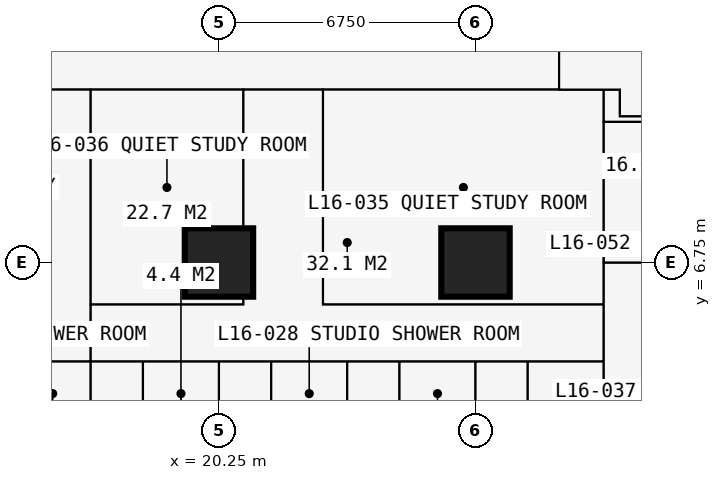
"""IFC4 building model, lengths in metres.
Left out: names, types, materials, properties, quantities, classifications, styles, units other than length and angle.
Written with IfcOpenShell. Run it as: python <this file> out.ifc"""

import sys

from ifc_helpers import new_model, si_unit, direction, frame, frame_2d, origin, origin_2d, place, context, subcontext, project, spatial, rectangle, extrude, element, fill, save


model = new_model("IFC4")
c1 = context("Model", 3, precision=1e-05, world=origin(), true_north=direction((0.0, 1.0)))
c2 = subcontext(c1, "Body", "Model", "MODEL_VIEW")
j1 = project(units=[si_unit("LENGTHUNIT", "METRE"), si_unit("PLANEANGLEUNIT", "RADIAN")], contexts=[c1])
p1 = place(None, origin())
s1 = spatial("IfcSite", under=j1, at=p1, CompositionType="ELEMENT")
p2 = place(p1, origin())
s2 = spatial("IfcBuilding", under=s1, at=p2, CompositionType="ELEMENT")
p3 = place(p2, frame((0.0, 0.0, 61.2)))
s3 = spatial("IfcBuildingStorey", under=s2, at=p3, CompositionType="ELEMENT", Elevation=61.2)
for number, where, z_axis, x_axis in (
    (1, (20.25, 6.75, 0.0), (0.0, 0.0, 1.0), (1.0, 0.0, 0.0)),
    (2, (27.0, 6.75, 0.0), (0.0, 0.0, 1.0), (1.0, 0.0, 0.0)),
):
    element("IfcColumn", number, at=place(p3, frame(where, z_axis=z_axis, x_axis=x_axis)), inside=s3, PredefinedType="COLUMN", context=c2, shape_type="SweptSolid", body=[
        extrude(rectangle(XDim=1.8, YDim=1.8, at=origin_2d()), origin(), (0.0, 0.0, 1.0), 3.6),
    ])
p4 = place(p3, frame((6.75, 4.15, 0.0), z_axis=(0.0, 0.0, 1.0), x_axis=(1.0, 0.0, 0.0)))
e3 = element("IfcWall", 3, at=p4, inside=s3, PredefinedType="PARTITIONING", context=c2, shape_type="SweptSolid", body=[
    extrude(rectangle(XDim=23.625, YDim=0.1, at=frame_2d((11.812, 0.0))), origin(), (0.0, 0.0, 1.0), 3.375),
])
p5 = place(p4, frame((0.2, 0.0, 0.0)))
e4 = element("IfcOpeningElement", 4, at=p5, cuts=e3, PredefinedType="OPENING", context=c2, shape_type="SweptSolid", body=[
    extrude(rectangle(XDim=0.95, YDim=2.2, at=frame_2d((0.475, 1.1))), frame((0.0, 0.06, 0.0), z_axis=(0.0, -1.0, 0.0), x_axis=(1.0, 0.0, 0.0)), (0.0, 0.0, 1.0), 0.12),
])
p6 = place(p4, frame((3.625, 0.0, 0.0)))
e5 = element("IfcOpeningElement", 5, at=p6, cuts=e3, PredefinedType="OPENING", context=c2, shape_type="SweptSolid", body=[
    extrude(rectangle(XDim=0.95, YDim=2.2, at=frame_2d((0.475, 1.1))), frame((0.0, 0.06, 0.0), z_axis=(0.0, -1.0, 0.0), x_axis=(1.0, 0.0, 0.0)), (0.0, 0.0, 1.0), 0.12),
])
p7 = place(p4, frame((7.0, 0.0, 0.0)))
e6 = element("IfcOpeningElement", 6, at=p7, cuts=e3, PredefinedType="OPENING", context=c2, shape_type="SweptSolid", body=[
    extrude(rectangle(XDim=0.95, YDim=2.2, at=frame_2d((0.475, 1.1))), frame((0.0, 0.06, 0.0), z_axis=(0.0, -1.0, 0.0), x_axis=(1.0, 0.0, 0.0)), (0.0, 0.0, 1.0), 0.12),
])
p8 = place(p4, frame((10.325, 0.0, 0.0)))
e7 = element("IfcOpeningElement", 7, at=p8, cuts=e3, PredefinedType="OPENING", context=c2, shape_type="SweptSolid", body=[
    extrude(rectangle(XDim=0.95, YDim=2.2, at=frame_2d((0.475, 1.1))), frame((0.0, 0.06, 0.0), z_axis=(0.0, -1.0, 0.0), x_axis=(1.0, 0.0, 0.0)), (0.0, 0.0, 1.0), 0.12),
])
p9 = place(p4, frame((13.75, 0.0, 0.0)))
e8 = element("IfcOpeningElement", 8, at=p9, cuts=e3, PredefinedType="OPENING", context=c2, shape_type="SweptSolid", body=[
    extrude(rectangle(XDim=0.95, YDim=2.2, at=frame_2d((0.475, 1.1))), frame((0.0, 0.06, 0.0), z_axis=(0.0, -1.0, 0.0), x_axis=(1.0, 0.0, 0.0)), (0.0, 0.0, 1.0), 0.12),
])
p10 = place(p4, frame((17.125, 0.0, 0.0)))
e9 = element("IfcOpeningElement", 9, at=p10, cuts=e3, PredefinedType="OPENING", context=c2, shape_type="SweptSolid", body=[
    extrude(rectangle(XDim=0.95, YDim=2.2, at=frame_2d((0.475, 1.1))), frame((0.0, 0.06, 0.0), z_axis=(0.0, -1.0, 0.0), x_axis=(1.0, 0.0, 0.0)), (0.0, 0.0, 1.0), 0.12),
])
p11 = place(p4, frame((20.5, 0.0, 0.0)))
e10 = element("IfcOpeningElement", 10, at=p11, cuts=e3, PredefinedType="OPENING", context=c2, shape_type="SweptSolid", body=[
    extrude(rectangle(XDim=0.95, YDim=2.2, at=frame_2d((0.475, 1.1))), frame((0.0, 0.06, 0.0), z_axis=(0.0, -1.0, 0.0), x_axis=(1.0, 0.0, 0.0)), (0.0, 0.0, 1.0), 0.12),
])
p12 = place(p3, frame((10.125, 11.3, 0.0), z_axis=(0.0, 0.0, 1.0), x_axis=(1.0, 0.0, 0.0)))
e11 = element("IfcWall", 11, at=p12, inside=s3, PredefinedType="PARTITIONING", context=c2, shape_type="SweptSolid", body=[
    extrude(rectangle(XDim=20.675, YDim=0.15, at=frame_2d((10.337, 0.0))), origin(), (0.0, 0.0, 1.0), 3.375),
])
p13 = place(p12, frame((5.2, 0.0, 0.0)))
e12 = element("IfcOpeningElement", 12, at=p13, cuts=e11, PredefinedType="OPENING", context=c2, shape_type="SweptSolid", body=[
    extrude(rectangle(XDim=1.0, YDim=2.2, at=frame_2d((0.5, 1.1))), frame((0.0, 0.085, 0.0), z_axis=(0.0, -1.0, 0.0), x_axis=(1.0, 0.0, 0.0)), (0.0, 0.0, 1.0), 0.17),
])
p14 = place(p12, frame((11.312, 0.0, 0.0)))
e13 = element("IfcOpeningElement", 13, at=p14, cuts=e11, PredefinedType="OPENING", context=c2, shape_type="SweptSolid", body=[
    extrude(rectangle(XDim=1.0, YDim=2.2, at=frame_2d((0.5, 1.1))), frame((0.0, 0.085, 0.0), z_axis=(0.0, -1.0, 0.0), x_axis=(1.0, 0.0, 0.0)), (0.0, 0.0, 1.0), 0.17),
])
p15 = place(p12, frame((2.425, 0.0, 0.0)))
e14 = element("IfcOpeningElement", 14, at=p15, cuts=e11, PredefinedType="OPENING", context=c2, shape_type="SweptSolid", body=[
    extrude(rectangle(XDim=0.95, YDim=2.2, at=frame_2d((0.475, 1.1))), frame((0.0, 0.085, 0.0), z_axis=(0.0, -1.0, 0.0), x_axis=(1.0, 0.0, 0.0)), (0.0, 0.0, 1.0), 0.17),
])
p16 = place(p3, frame((16.875, -0.734, 0.0), z_axis=(0.0, 0.0, 1.0), x_axis=(0.0, 1.0, 0.0)))
e15 = element("IfcWall", 15, at=p16, inside=s3, PredefinedType="PARTITIONING", context=c2, shape_type="SweptSolid", body=[
    extrude(rectangle(XDim=12.034, YDim=0.15, at=frame_2d((6.017, 0.0))), origin(), (0.0, 0.0, 1.0), 3.375),
])
p17 = place(p3, frame((16.875, 5.65, 0.0), z_axis=(0.0, 0.0, 1.0), x_axis=(1.0, 0.0, 0.0)))
e16 = element("IfcWall", 16, at=p17, inside=s3, PredefinedType="PARTITIONING", context=c2, shape_type="SweptSolid", body=[
    extrude(rectangle(XDim=4.012, YDim=0.15, at=frame_2d((2.006, 0.0))), origin(), (0.0, 0.0, 1.0), 3.375),
])
p18 = place(p3, frame((18.25, 1.95, 0.0), z_axis=(0.0, 0.0, 1.0), x_axis=(0.0, 1.0, 0.0)))
e17 = element("IfcWall", 17, at=p18, inside=s3, PredefinedType="PARTITIONING", context=c2, shape_type="SweptSolid", body=[
    extrude(rectangle(XDim=2.2, YDim=0.1, at=frame_2d((1.1, 0.0))), origin(), (0.0, 0.0, 1.0), 3.375),
])
p19 = place(p18, frame((0.65, 0.0, 0.0)))
e18 = element("IfcOpeningElement", 18, at=p19, cuts=e17, PredefinedType="OPENING", context=c2, shape_type="SweptSolid", body=[
    extrude(rectangle(XDim=0.9, YDim=2.2, at=frame_2d((0.45, 1.1))), frame((0.0, 0.06, 0.0), z_axis=(0.0, -1.0, 0.0), x_axis=(1.0, 0.0, 0.0)), (0.0, 0.0, 1.0), 0.12),
])
p20 = place(p3, frame((20.25, -0.734, 0.0), z_axis=(0.0, 0.0, 1.0), x_axis=(0.0, 1.0, 0.0)))
e19 = element("IfcWall", 19, at=p20, inside=s3, PredefinedType="PARTITIONING", context=c2, shape_type="SweptSolid", body=[
    extrude(rectangle(XDim=4.884, YDim=0.175, at=frame_2d((2.442, 0.0))), origin(), (0.0, 0.0, 1.0), 2.61),
])
p21 = place(p3, frame((20.887, 5.65, 0.0), z_axis=(0.0, 0.0, 1.0), x_axis=(0.0, 1.0, 0.0)))
e20 = element("IfcWall", 20, at=p21, inside=s3, PredefinedType="PARTITIONING", context=c2, shape_type="SweptSolid", body=[
    extrude(rectangle(XDim=5.65, YDim=0.15, at=frame_2d((2.825, 0.0))), origin(), (0.0, 0.0, 1.0), 3.375),
])
p22 = place(p21, frame((2.35, 0.0, 0.0)))
e21 = element("IfcOpeningElement", 21, at=p22, cuts=e20, PredefinedType="OPENING", context=c2, shape_type="SweptSolid", body=[
    extrude(rectangle(XDim=0.95, YDim=2.2, at=frame_2d((0.475, 1.1))), frame((0.0, 0.085, 0.0), z_axis=(0.0, -1.0, 0.0), x_axis=(1.0, 0.0, 0.0)), (0.0, 0.0, 1.0), 0.17),
])
p23 = place(p3, frame((21.625, 1.95, 0.0), z_axis=(0.0, 0.0, 1.0), x_axis=(0.0, 1.0, 0.0)))
e22 = element("IfcWall", 22, at=p23, inside=s3, PredefinedType="PARTITIONING", context=c2, shape_type="SweptSolid", body=[
    extrude(rectangle(XDim=2.2, YDim=0.1, at=frame_2d((1.1, 0.0))), origin(), (0.0, 0.0, 1.0), 3.375),
])
p24 = place(p23, frame((0.65, 0.0, 0.0)))
e23 = element("IfcOpeningElement", 23, at=p24, cuts=e22, PredefinedType="OPENING", context=c2, shape_type="SweptSolid", body=[
    extrude(rectangle(XDim=0.9, YDim=2.2, at=frame_2d((0.45, 1.1))), frame((0.0, 0.06, 0.0), z_axis=(0.0, -1.0, 0.0), x_axis=(1.0, 0.0, 0.0)), (0.0, 0.0, 1.0), 0.12),
])
p25 = place(p3, frame((22.988, 5.65, 0.0), z_axis=(0.0, 0.0, 1.0), x_axis=(1.0, 0.0, 0.0)))
e24 = element("IfcWall", 24, at=p25, inside=s3, PredefinedType="PARTITIONING", context=c2, shape_type="SweptSolid", body=[
    extrude(rectangle(XDim=7.387, YDim=0.15, at=frame_2d((3.694, 0.0))), origin(), (0.0, 0.0, 1.0), 3.375),
])
p26 = place(p25, frame((2.15, 0.0, 0.0)))
e25 = element("IfcOpeningElement", 25, at=p26, cuts=e24, PredefinedType="OPENING", context=c2, shape_type="SweptSolid", body=[
    extrude(rectangle(XDim=0.95, YDim=2.2, at=frame_2d((0.475, 1.1))), frame((0.0, 0.085, 0.0), z_axis=(0.0, -1.0, 0.0), x_axis=(1.0, 0.0, 0.0)), (0.0, 0.0, 1.0), 0.17),
])
p27 = place(p3, frame((22.988, 5.65, 0.0), z_axis=(0.0, 0.0, 1.0), x_axis=(0.0, 1.0, 0.0)))
e26 = element("IfcWall", 26, at=p27, inside=s3, PredefinedType="PARTITIONING", context=c2, shape_type="SweptSolid", body=[
    extrude(rectangle(XDim=5.65, YDim=0.15, at=frame_2d((2.825, 0.0))), origin(), (0.0, 0.0, 1.0), 3.375),
])
p28 = place(p3, frame((23.625, -0.734, 0.0), z_axis=(0.0, 0.0, 1.0), x_axis=(0.0, 1.0, 0.0)))
e27 = element("IfcWall", 27, at=p28, inside=s3, PredefinedType="PARTITIONING", context=c2, shape_type="SweptSolid", body=[
    extrude(rectangle(XDim=4.884, YDim=0.175, at=frame_2d((2.442, 0.0))), origin(), (0.0, 0.0, 1.0), 3.375),
])
p29 = place(p3, frame((25.0, 1.95, 0.0), z_axis=(0.0, 0.0, 1.0), x_axis=(0.0, 1.0, 0.0)))
e28 = element("IfcWall", 28, at=p29, inside=s3, PredefinedType="PARTITIONING", context=c2, shape_type="SweptSolid", body=[
    extrude(rectangle(XDim=2.2, YDim=0.1, at=frame_2d((1.1, 0.0))), origin(), (0.0, 0.0, 1.0), 3.375),
])
p30 = place(p29, frame((0.65, 0.0, 0.0)))
e29 = element("IfcOpeningElement", 29, at=p30, cuts=e28, PredefinedType="OPENING", context=c2, shape_type="SweptSolid", body=[
    extrude(rectangle(XDim=0.9, YDim=2.2, at=frame_2d((0.45, 1.1))), frame((0.0, 0.06, 0.0), z_axis=(0.0, -1.0, 0.0), x_axis=(1.0, 0.0, 0.0)), (0.0, 0.0, 1.0), 0.12),
])
p31 = place(p3, frame((27.0, -0.734, 0.0), z_axis=(0.0, 0.0, 1.0), x_axis=(0.0, 1.0, 0.0)))
e30 = element("IfcWall", 30, at=p31, inside=s3, PredefinedType="PARTITIONING", context=c2, shape_type="SweptSolid", body=[
    extrude(rectangle(XDim=4.884, YDim=0.175, at=frame_2d((2.442, 0.0))), origin(), (0.0, 0.0, 1.0), 2.61),
])
p32 = place(p3, frame((28.375, 1.95, 0.0), z_axis=(0.0, 0.0, 1.0), x_axis=(0.0, 1.0, 0.0)))
e31 = element("IfcWall", 31, at=p32, inside=s3, PredefinedType="PARTITIONING", context=c2, shape_type="SweptSolid", body=[
    extrude(rectangle(XDim=2.2, YDim=0.1, at=frame_2d((1.1, 0.0))), origin(), (0.0, 0.0, 1.0), 3.375),
])
p33 = place(p32, frame((0.65, 0.0, 0.0)))
e32 = element("IfcOpeningElement", 32, at=p33, cuts=e31, PredefinedType="OPENING", context=c2, shape_type="SweptSolid", body=[
    extrude(rectangle(XDim=0.9, YDim=2.2, at=frame_2d((0.45, 1.1))), frame((0.0, 0.06, 0.0), z_axis=(0.0, -1.0, 0.0), x_axis=(1.0, 0.0, 0.0)), (0.0, 0.0, 1.0), 0.12),
])
p34 = place(p3, frame((29.2, 11.3, 0.0), z_axis=(0.0, 0.0, 1.0), x_axis=(0.0, 1.0, 0.0)))
e33 = element("IfcWall", 33, at=p34, inside=s3, PredefinedType="PARTITIONING", context=c2, shape_type="SweptSolid", body=[
    extrude(rectangle(XDim=17.9, YDim=0.2, at=frame_2d((8.95, 0.0))), origin(), (0.0, 0.0, 1.0), 3.375),
])
p35 = place(p34, frame((8.35, 0.0, 0.0)))
e34 = element("IfcOpeningElement", 34, at=p35, cuts=e33, PredefinedType="OPENING", context=c2, shape_type="SweptSolid", body=[
    extrude(rectangle(XDim=1.2, YDim=2.2, at=frame_2d((0.6, 1.1))), frame((0.0, 0.11, 0.0), z_axis=(0.0, -1.0, 0.0), x_axis=(1.0, 0.0, 0.0)), (0.0, 0.0, 1.0), 0.22),
])
p36 = place(p3, frame((30.375, -0.734, 0.0), z_axis=(0.0, 0.0, 1.0), x_axis=(0.0, 1.0, 0.0)))
e35 = element("IfcWall", 35, at=p36, inside=s3, PredefinedType="PARTITIONING", context=c2, shape_type="SweptSolid", body=[
    extrude(rectangle(XDim=12.034, YDim=0.15, at=frame_2d((6.017, 0.0))), origin(), (0.0, 0.0, 1.0), 3.375),
])
p37 = place(p36, frame((5.134, 0.0, 0.0)))
e36 = element("IfcOpeningElement", 36, at=p37, cuts=e35, PredefinedType="OPENING", context=c2, shape_type="SweptSolid", body=[
    extrude(rectangle(XDim=1.0, YDim=2.2, at=frame_2d((0.5, 1.1))), frame((0.0, 0.085, 0.0), z_axis=(0.0, -1.0, 0.0), x_axis=(1.0, 0.0, 0.0)), (0.0, 0.0, 1.0), 0.17),
])
p38 = place(p3, frame((30.375, 6.75, 0.0), z_axis=(0.0, 0.0, 1.0), x_axis=(1.0, 0.0, 0.0)))
e37 = element("IfcWall", 37, at=p38, inside=s3, PredefinedType="PARTITIONING", context=c2, shape_type="SweptSolid", body=[
    extrude(rectangle(XDim=5.975, YDim=0.15, at=frame_2d((2.988, 0.0))), origin(), (0.0, 0.0, 1.0), 2.877),
])
p39 = place(p3, frame((30.375, 10.45, 0.0), z_axis=(0.0, 0.0, 1.0), x_axis=(1.0, 0.0, 0.0)))
e38 = element("IfcWall", 38, at=p39, inside=s3, PredefinedType="PARTITIONING", context=c2, shape_type="SweptSolid", body=[
    extrude(rectangle(XDim=4.475, YDim=0.15, at=frame_2d((2.238, 0.0))), origin(), (0.0, 0.0, 1.0), 3.375),
])
p40 = place(p39, frame((2.35, 0.0, 0.0)))
e39 = element("IfcOpeningElement", 39, at=p40, cuts=e38, PredefinedType="OPENING", context=c2, shape_type="SweptSolid", body=[
    extrude(rectangle(XDim=0.95, YDim=2.2, at=frame_2d((0.475, 1.1))), frame((0.0, 0.085, 0.0), z_axis=(0.0, -1.0, 0.0), x_axis=(1.0, 0.0, 0.0)), (0.0, 0.0, 1.0), 0.17),
])
p41 = place(p3, frame((30.8, 10.6, 0.0), z_axis=(0.0, 0.0, 1.0), x_axis=(0.0, 1.0, 0.0)))
e40 = element("IfcWall", 40, at=p41, inside=s3, PredefinedType="PARTITIONING", context=c2, shape_type="SweptSolid", body=[
    extrude(rectangle(XDim=0.7, YDim=0.15, at=frame_2d((0.35, 0.0))), origin(), (0.0, 0.0, 1.0), 3.375),
])
p42 = place(p3, frame((30.8, 10.6, 0.0), z_axis=(0.0, 0.0, 1.0), x_axis=(1.0, 0.0, 0.0)))
e41 = element("IfcWall", 41, at=p42, inside=s3, PredefinedType="PARTITIONING", context=c2, shape_type="SweptSolid", body=[
    extrude(rectangle(XDim=1.85, YDim=0.15, at=frame_2d((0.925, 0.0))), origin(), (0.0, 0.0, 1.0), 3.375),
])
p43 = place(p13, origin())
e42 = element("IfcDoor", 42, at=p43, inside=s3, OperationType="SINGLE_SWING_LEFT", PredefinedType="DOOR", context=c2, shape_type="SweptSolid", body=[
    extrude(rectangle(XDim=1.0, YDim=2.2, at=frame_2d((0.5, 1.1))), frame((0.0, 0.025, 0.0), z_axis=(0.0, -1.0, 0.0), x_axis=(1.0, 0.0, 0.0)), (0.0, 0.0, 1.0), 0.05),
])
fill(e12, e42)
p44 = place(p8, origin())
e43 = element("IfcDoor", 43, at=p44, inside=s3, OperationType="SINGLE_SWING_LEFT", PredefinedType="DOOR", context=c2, shape_type="SweptSolid", body=[
    extrude(rectangle(XDim=0.95, YDim=2.2, at=frame_2d((0.475, 1.1))), frame((0.0, 0.025, 0.0), z_axis=(0.0, -1.0, 0.0), x_axis=(1.0, 0.0, 0.0)), (0.0, 0.0, 1.0), 0.05),
])
fill(e7, e43)
p45 = place(p19, origin())
e44 = element("IfcDoor", 44, at=p45, inside=s3, OperationType="SINGLE_SWING_RIGHT", PredefinedType="DOOR", context=c2, shape_type="SweptSolid", body=[
    extrude(rectangle(XDim=0.9, YDim=2.2, at=frame_2d((0.45, 1.1))), frame((0.0, 0.025, 0.0), z_axis=(0.0, -1.0, 0.0), x_axis=(1.0, 0.0, 0.0)), (0.0, 0.0, 1.0), 0.05),
])
fill(e18, e44)
p46 = place(p9, origin())
e45 = element("IfcDoor", 45, at=p46, inside=s3, OperationType="SINGLE_SWING_LEFT", PredefinedType="DOOR", context=c2, shape_type="SweptSolid", body=[
    extrude(rectangle(XDim=0.95, YDim=2.2, at=frame_2d((0.475, 1.1))), frame((0.0, 0.025, 0.0), z_axis=(0.0, -1.0, 0.0), x_axis=(1.0, 0.0, 0.0)), (0.0, 0.0, 1.0), 0.05),
])
fill(e8, e45)
p47 = place(p24, origin())
e46 = element("IfcDoor", 46, at=p47, inside=s3, OperationType="SINGLE_SWING_RIGHT", PredefinedType="DOOR", context=c2, shape_type="SweptSolid", body=[
    extrude(rectangle(XDim=0.9, YDim=2.2, at=frame_2d((0.45, 1.1))), frame((0.0, 0.025, 0.0), z_axis=(0.0, -1.0, 0.0), x_axis=(1.0, 0.0, 0.0)), (0.0, 0.0, 1.0), 0.05),
])
fill(e23, e46)
p48 = place(p10, origin())
e47 = element("IfcDoor", 47, at=p48, inside=s3, OperationType="SINGLE_SWING_LEFT", PredefinedType="DOOR", context=c2, shape_type="SweptSolid", body=[
    extrude(rectangle(XDim=0.95, YDim=2.2, at=frame_2d((0.475, 1.1))), frame((0.0, 0.025, 0.0), z_axis=(0.0, -1.0, 0.0), x_axis=(1.0, 0.0, 0.0)), (0.0, 0.0, 1.0), 0.05),
])
fill(e9, e47)
p49 = place(p30, origin())
e48 = element("IfcDoor", 48, at=p49, inside=s3, OperationType="SINGLE_SWING_RIGHT", PredefinedType="DOOR", context=c2, shape_type="SweptSolid", body=[
    extrude(rectangle(XDim=0.9, YDim=2.2, at=frame_2d((0.45, 1.1))), frame((0.0, 0.025, 0.0), z_axis=(0.0, -1.0, 0.0), x_axis=(1.0, 0.0, 0.0)), (0.0, 0.0, 1.0), 0.05),
])
fill(e29, e48)
p50 = place(p11, origin())
e49 = element("IfcDoor", 49, at=p50, inside=s3, OperationType="SINGLE_SWING_LEFT", PredefinedType="DOOR", context=c2, shape_type="SweptSolid", body=[
    extrude(rectangle(XDim=0.95, YDim=2.2, at=frame_2d((0.475, 1.1))), frame((0.0, 0.025, 0.0), z_axis=(0.0, -1.0, 0.0), x_axis=(1.0, 0.0, 0.0)), (0.0, 0.0, 1.0), 0.05),
])
fill(e10, e49)
p51 = place(p33, origin())
e50 = element("IfcDoor", 50, at=p51, inside=s3, OperationType="SINGLE_SWING_RIGHT", PredefinedType="DOOR", context=c2, shape_type="SweptSolid", body=[
    extrude(rectangle(XDim=0.9, YDim=2.2, at=frame_2d((0.45, 1.1))), frame((0.0, 0.025, 0.0), z_axis=(0.0, -1.0, 0.0), x_axis=(1.0, 0.0, 0.0)), (0.0, 0.0, 1.0), 0.05),
])
fill(e32, e50)
p52 = place(p14, origin())
e51 = element("IfcDoor", 51, at=p52, inside=s3, OperationType="SINGLE_SWING_LEFT", PredefinedType="DOOR", context=c2, shape_type="SweptSolid", body=[
    extrude(rectangle(XDim=1.0, YDim=2.2, at=frame_2d((0.5, 1.1))), frame((0.0, 0.025, 0.0), z_axis=(0.0, -1.0, 0.0), x_axis=(1.0, 0.0, 0.0)), (0.0, 0.0, 1.0), 0.05),
])
fill(e13, e51)
p53 = place(p26, origin())
e52 = element("IfcDoor", 52, at=p53, inside=s3, OperationType="SINGLE_SWING_LEFT", PredefinedType="DOOR", context=c2, shape_type="SweptSolid", body=[
    extrude(rectangle(XDim=0.95, YDim=2.2, at=frame_2d((0.475, 1.1))), frame((0.0, 0.025, 0.0), z_axis=(0.0, -1.0, 0.0), x_axis=(1.0, 0.0, 0.0)), (0.0, 0.0, 1.0), 0.05),
])
fill(e25, e52)
p54 = place(p22, origin())
e53 = element("IfcDoor", 53, at=p54, inside=s3, OperationType="SINGLE_SWING_LEFT", PredefinedType="DOOR", context=c2, shape_type="SweptSolid", body=[
    extrude(rectangle(XDim=0.95, YDim=2.2, at=frame_2d((0.475, 1.1))), frame((0.0, 0.025, 0.0), z_axis=(0.0, -1.0, 0.0), x_axis=(1.0, 0.0, 0.0)), (0.0, 0.0, 1.0), 0.05),
])
fill(e21, e53)
p55 = place(p37, origin())
e54 = element("IfcDoor", 54, at=p55, inside=s3, OperationType="SINGLE_SWING_LEFT", PredefinedType="DOOR", context=c2, shape_type="SweptSolid", body=[
    extrude(rectangle(XDim=1.0, YDim=2.2, at=frame_2d((0.5, 1.1))), frame((0.0, 0.025, 0.0), z_axis=(0.0, -1.0, 0.0), x_axis=(1.0, 0.0, 0.0)), (0.0, 0.0, 1.0), 0.05),
])
fill(e36, e54)
save(model, sys.argv[1])
